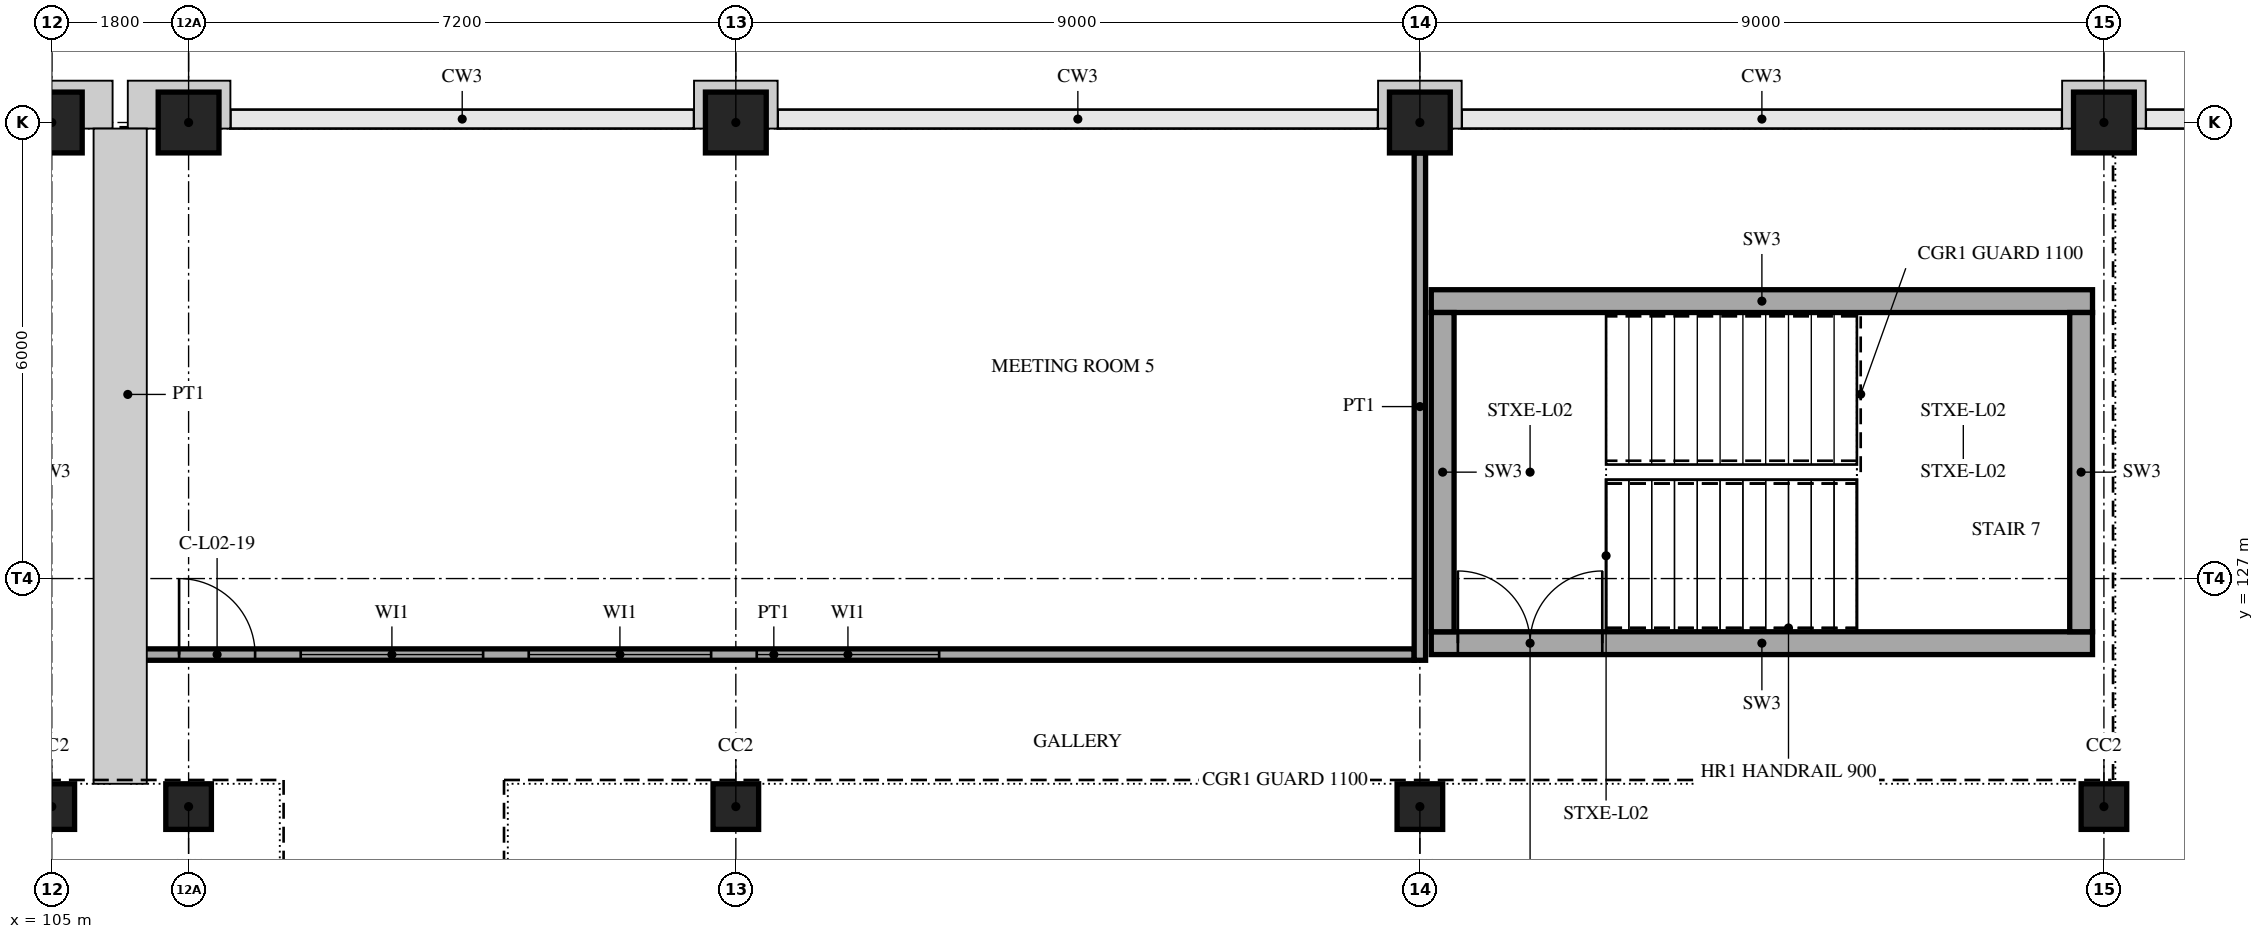
"""IFC4 building model, lengths in metres.
Left out: names, types, materials, properties, quantities, classifications, styles, units other than length and angle.
Written with IfcOpenShell. Run it as: python <this file> out.ifc"""

import sys

from ifc_helpers import new_model, si_unit, direction, frame, frame_2d, origin, origin_2d, place, context, subcontext, project, spatial, rectangle, extrude, element, fill, save


model = new_model("IFC4")
c1 = context("Model", 3, precision=1e-05, world=origin(), true_north=direction((0.0, 1.0)))
c2 = subcontext(c1, "Body", "Model", "MODEL_VIEW")
j1 = project(units=[si_unit("LENGTHUNIT", "METRE"), si_unit("PLANEANGLEUNIT", "RADIAN")], contexts=[c1])
p1 = place(None, origin())
s1 = spatial("IfcSite", under=j1, at=p1, CompositionType="ELEMENT")
p2 = place(p1, origin())
s2 = spatial("IfcBuilding", under=s1, at=p2, CompositionType="ELEMENT")
p3 = place(p2, frame((0.0, 0.0, 10.0)))
s3 = spatial("IfcBuildingStorey", under=s2, at=p3, CompositionType="ELEMENT", Elevation=10.0)
p4 = place(p3, frame((105.0, 124.0, 0.0), z_axis=(0.0, 0.0, 1.0), x_axis=(1.0, 0.0, 0.0)))
e1 = element("IfcColumn", 1, at=p4, inside=s3, PredefinedType="COLUMN", context=c2, shape_type="SweptSolid", body=[
    extrude(rectangle(XDim=0.6, YDim=0.6, at=origin_2d()), origin(), (0.0, 0.0, 1.0), 5.0),
])
p5 = place(p3, frame((105.0, 133.0, 0.0), z_axis=(0.0, 0.0, 1.0), x_axis=(1.0, 0.0, 0.0)))
e2 = element("IfcColumn", 2, at=p5, inside=s3, PredefinedType="COLUMN", context=c2, shape_type="SweptSolid", body=[
    extrude(rectangle(XDim=0.8, YDim=0.8, at=origin_2d()), origin(), (0.0, 0.0, 1.0), 5.0),
])
p6 = place(p3, frame((106.8, 124.0, 0.0), z_axis=(0.0, 0.0, 1.0), x_axis=(1.0, 0.0, 0.0)))
e3 = element("IfcColumn", 3, at=p6, inside=s3, PredefinedType="COLUMN", context=c2, shape_type="SweptSolid", body=[
    extrude(rectangle(XDim=0.6, YDim=0.6, at=origin_2d()), origin(), (0.0, 0.0, 1.0), 5.0),
])
p7 = place(p3, frame((106.8, 133.0, 0.0), z_axis=(0.0, 0.0, 1.0), x_axis=(1.0, 0.0, 0.0)))
e4 = element("IfcColumn", 4, at=p7, inside=s3, PredefinedType="COLUMN", context=c2, shape_type="SweptSolid", body=[
    extrude(rectangle(XDim=0.8, YDim=0.8, at=origin_2d()), origin(), (0.0, 0.0, 1.0), 5.0),
])
p8 = place(p3, frame((114.0, 124.0, 0.0), z_axis=(0.0, 0.0, 1.0), x_axis=(1.0, 0.0, 0.0)))
e5 = element("IfcColumn", 5, at=p8, inside=s3, PredefinedType="COLUMN", context=c2, shape_type="SweptSolid", body=[
    extrude(rectangle(XDim=0.6, YDim=0.6, at=origin_2d()), origin(), (0.0, 0.0, 1.0), 5.0),
])
p9 = place(p3, frame((114.0, 133.0, 0.0), z_axis=(0.0, 0.0, 1.0), x_axis=(1.0, 0.0, 0.0)))
e6 = element("IfcColumn", 6, at=p9, inside=s3, PredefinedType="COLUMN", context=c2, shape_type="SweptSolid", body=[
    extrude(rectangle(XDim=0.8, YDim=0.8, at=origin_2d()), origin(), (0.0, 0.0, 1.0), 5.0),
])
p10 = place(p3, frame((123.0, 124.0, 0.0), z_axis=(0.0, 0.0, 1.0), x_axis=(1.0, 0.0, 0.0)))
e7 = element("IfcColumn", 7, at=p10, inside=s3, PredefinedType="COLUMN", context=c2, shape_type="SweptSolid", body=[
    extrude(rectangle(XDim=0.6, YDim=0.6, at=origin_2d()), origin(), (0.0, 0.0, 1.0), 5.0),
])
p11 = place(p3, frame((123.0, 133.0, 0.0), z_axis=(0.0, 0.0, 1.0), x_axis=(1.0, 0.0, 0.0)))
e8 = element("IfcColumn", 8, at=p11, inside=s3, PredefinedType="COLUMN", context=c2, shape_type="SweptSolid", body=[
    extrude(rectangle(XDim=0.8, YDim=0.8, at=origin_2d()), origin(), (0.0, 0.0, 1.0), 5.0),
])
p12 = place(p3, frame((132.0, 124.0, 0.0), z_axis=(0.0, 0.0, 1.0), x_axis=(1.0, 0.0, 0.0)))
e9 = element("IfcColumn", 9, at=p12, inside=s3, PredefinedType="COLUMN", context=c2, shape_type="SweptSolid", body=[
    extrude(rectangle(XDim=0.6, YDim=0.6, at=origin_2d()), origin(), (0.0, 0.0, 1.0), 5.0),
])
p13 = place(p3, frame((132.0, 133.0, 0.0), z_axis=(0.0, 0.0, 1.0), x_axis=(1.0, 0.0, 0.0)))
e10 = element("IfcColumn", 10, at=p13, inside=s3, PredefinedType="COLUMN", context=c2, shape_type="SweptSolid", body=[
    extrude(rectangle(XDim=0.8, YDim=0.8, at=origin_2d()), origin(), (0.0, 0.0, 1.0), 5.0),
])
p14 = place(p3, frame((123.15, 126.15, 0.0), z_axis=(0.0, 0.0, 1.0), x_axis=(1.0, 0.0, 0.0)))
e11 = element("IfcWall", 11, at=p14, inside=s3, PredefinedType="SHEAR", context=c2, shape_type="SweptSolid", body=[
    extrude(rectangle(XDim=8.7, YDim=0.3, at=frame_2d((4.35, 0.0))), origin(), (0.0, 0.0, 1.0), 5.0),
])
p15 = place(p14, frame((0.35, 0.0, 0.0)))
e12 = element("IfcOpeningElement", 12, at=p15, cuts=e11, PredefinedType="OPENING", context=c2, shape_type="SweptSolid", body=[
    extrude(rectangle(XDim=1.9, YDim=2.1, at=frame_2d((0.95, 1.05))), frame((0.0, 0.16, 0.0), z_axis=(0.0, -1.0, 0.0), x_axis=(1.0, 0.0, 0.0)), (0.0, 0.0, 1.0), 0.32),
])
p16 = place(p3, frame((123.15, 130.65, 0.0), z_axis=(0.0, 0.0, 1.0), x_axis=(1.0, 0.0, 0.0)))
e13 = element("IfcWall", 13, at=p16, inside=s3, PredefinedType="SHEAR", context=c2, shape_type="SweptSolid", body=[
    extrude(rectangle(XDim=8.7, YDim=0.3, at=frame_2d((4.35, 0.0))), origin(), (0.0, 0.0, 1.0), 5.0),
])
for number, where, z_axis, x_axis in (
    (14, (123.3, 126.3, 0.0), (0.0, 0.0, 1.0), (0.0, 1.0, 0.0)),
    (15, (131.7, 126.3, 0.0), (0.0, 0.0, 1.0), (0.0, 1.0, 0.0)),
):
    element("IfcWall", number, at=place(p3, frame(where, z_axis=z_axis, x_axis=x_axis)), inside=s3, PredefinedType="SHEAR", context=c2, shape_type="SweptSolid", body=[
        extrude(rectangle(XDim=4.2, YDim=0.3, at=frame_2d((2.1, 0.0))), origin(), (0.0, 0.0, 1.0), 5.0),
    ])
p17 = place(p3, frame((106.075, 126.0, 0.0), z_axis=(0.0, 0.0, 1.0), x_axis=(1.0, 0.0, 0.0)))
e16 = element("IfcWall", 16, at=p17, inside=s3, PredefinedType="PARTITIONING", context=c2, shape_type="SweptSolid", body=[
    extrude(rectangle(XDim=16.85, YDim=0.15, at=frame_2d((8.425, 0.0))), origin(), (0.0, 0.0, 1.0), 4.8),
])
p18 = place(p17, frame((0.6, 0.0, 0.0)))
e17 = element("IfcOpeningElement", 17, at=p18, cuts=e16, PredefinedType="OPENING", context=c2, shape_type="SweptSolid", body=[
    extrude(rectangle(XDim=1.0, YDim=2.1, at=frame_2d((0.5, 1.05))), frame((0.0, 0.085, 0.0), z_axis=(0.0, -1.0, 0.0), x_axis=(1.0, 0.0, 0.0)), (0.0, 0.0, 1.0), 0.17),
])
p19 = place(p17, frame((2.2, 0.0, 0.9)))
e18 = element("IfcOpeningElement", 18, at=p19, cuts=e16, PredefinedType="OPENING", context=c2, shape_type="SweptSolid", body=[
    extrude(rectangle(XDim=2.4, YDim=1.5, at=frame_2d((1.2, 0.75))), frame((0.0, 0.085, 0.0), z_axis=(0.0, -1.0, 0.0), x_axis=(1.0, 0.0, 0.0)), (0.0, 0.0, 1.0), 0.17),
])
p20 = place(p17, frame((5.2, 0.0, 0.9)))
e19 = element("IfcOpeningElement", 19, at=p20, cuts=e16, PredefinedType="OPENING", context=c2, shape_type="SweptSolid", body=[
    extrude(rectangle(XDim=2.4, YDim=1.5, at=frame_2d((1.2, 0.75))), frame((0.0, 0.085, 0.0), z_axis=(0.0, -1.0, 0.0), x_axis=(1.0, 0.0, 0.0)), (0.0, 0.0, 1.0), 0.17),
])
p21 = place(p17, frame((8.2, 0.0, 0.9)))
e20 = element("IfcOpeningElement", 20, at=p21, cuts=e16, PredefinedType="OPENING", context=c2, shape_type="SweptSolid", body=[
    extrude(rectangle(XDim=2.4, YDim=1.5, at=frame_2d((1.2, 0.75))), frame((0.0, 0.085, 0.0), z_axis=(0.0, -1.0, 0.0), x_axis=(1.0, 0.0, 0.0)), (0.0, 0.0, 1.0), 0.17),
])
p22 = place(p3, frame((106.0, 125.925, 0.0), z_axis=(0.0, 0.0, 1.0), x_axis=(0.0, 1.0, 0.0)))
e21 = element("IfcWall", 21, at=p22, inside=s3, PredefinedType="PARTITIONING", context=c2, shape_type="SweptSolid", body=[
    extrude(rectangle(XDim=6.995, YDim=0.15, at=frame_2d((3.498, 0.0))), origin(), (0.0, 0.0, 1.0), 4.8),
])
p23 = place(p3, frame((123.0, 125.925, 0.0), z_axis=(0.0, 0.0, 1.0), x_axis=(0.0, 1.0, 0.0)))
e22 = element("IfcWall", 22, at=p23, inside=s3, PredefinedType="PARTITIONING", context=c2, shape_type="SweptSolid", body=[
    extrude(rectangle(XDim=6.675, YDim=0.15, at=frame_2d((3.337, 0.0))), origin(), (0.0, 0.0, 1.0), 4.0),
])
p24 = place(p15, origin())
e23 = element("IfcDoor", 23, at=p24, inside=s3, OperationType="DOUBLE_DOOR_SINGLE_SWING", PredefinedType="NOTDEFINED", context=c2, shape_type="SweptSolid", body=[
    extrude(rectangle(XDim=1.9, YDim=2.1, at=frame_2d((0.95, 1.05))), frame((0.0, 0.025, 0.0), z_axis=(0.0, -1.0, 0.0), x_axis=(1.0, 0.0, 0.0)), (0.0, 0.0, 1.0), 0.05),
])
fill(e12, e23)
p25 = place(p18, origin())
e24 = element("IfcDoor", 24, at=p25, inside=s3, OperationType="SINGLE_SWING_LEFT", PredefinedType="NOTDEFINED", context=c2, shape_type="SweptSolid", body=[
    extrude(rectangle(XDim=1.0, YDim=2.1, at=frame_2d((0.5, 1.05))), frame((0.0, 0.025, 0.0), z_axis=(0.0, -1.0, 0.0), x_axis=(1.0, 0.0, 0.0)), (0.0, 0.0, 1.0), 0.05),
])
fill(e17, e24)
p26 = place(p19, origin())
e25 = element("IfcWindow", 25, at=p26, inside=s3, PartitioningType="SINGLE_PANEL", PredefinedType="WINDOW", context=c2, shape_type="SweptSolid", body=[
    extrude(rectangle(XDim=2.4, YDim=1.5, at=frame_2d((1.2, 0.75))), frame((0.0, 0.03, 0.0), z_axis=(0.0, -1.0, 0.0), x_axis=(1.0, 0.0, 0.0)), (0.0, 0.0, 1.0), 0.06),
])
fill(e18, e25)
p27 = place(p20, origin())
e26 = element("IfcWindow", 26, at=p27, inside=s3, PartitioningType="SINGLE_PANEL", PredefinedType="WINDOW", context=c2, shape_type="SweptSolid", body=[
    extrude(rectangle(XDim=2.4, YDim=1.5, at=frame_2d((1.2, 0.75))), frame((0.0, 0.03, 0.0), z_axis=(0.0, -1.0, 0.0), x_axis=(1.0, 0.0, 0.0)), (0.0, 0.0, 1.0), 0.06),
])
fill(e19, e26)
p28 = place(p21, origin())
e27 = element("IfcWindow", 27, at=p28, inside=s3, PartitioningType="SINGLE_PANEL", PredefinedType="WINDOW", context=c2, shape_type="SweptSolid", body=[
    extrude(rectangle(XDim=2.4, YDim=1.5, at=frame_2d((1.2, 0.75))), frame((0.0, 0.03, 0.0), z_axis=(0.0, -1.0, 0.0), x_axis=(1.0, 0.0, 0.0)), (0.0, 0.0, 1.0), 0.06),
])
fill(e20, e27)
save(model, sys.argv[1])
